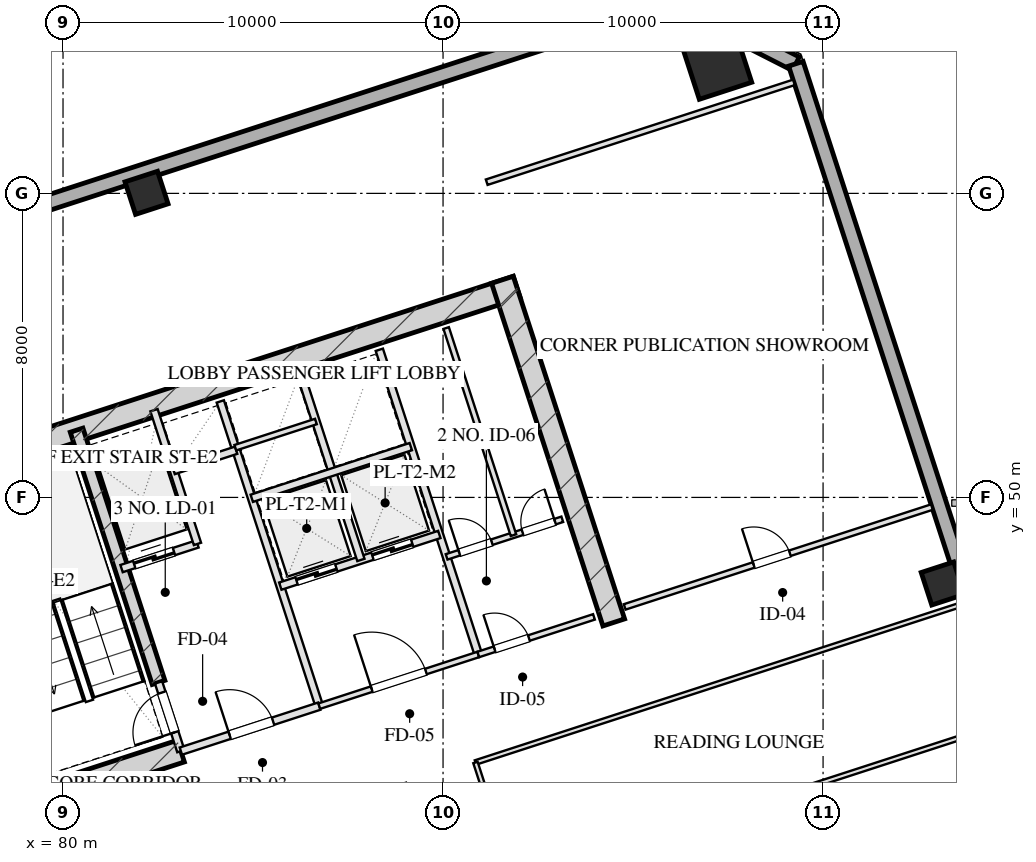
"""IFC4 building model, lengths in metres.
Left out: names, types, materials, properties, quantities, classifications, styles, units other than length and angle.
Written with IfcOpenShell. Run it as: python <this file> out.ifc"""

import sys

from ifc_helpers import new_model, si_unit, direction, frame, frame_2d, origin, origin_2d, place, context, subcontext, project, spatial, rectangle, hollow_rectangle, extrude, element, fill, save


model = new_model("IFC4")
c1 = context("Model", 3, precision=1e-05, world=origin(), true_north=direction((0.0, 1.0)))
c2 = subcontext(c1, "Body", "Model", "MODEL_VIEW")
j1 = project(units=[si_unit("LENGTHUNIT", "METRE"), si_unit("PLANEANGLEUNIT", "RADIAN")], contexts=[c1])
p1 = place(None, origin())
s1 = spatial("IfcSite", under=j1, at=p1, CompositionType="ELEMENT")
p2 = place(p1, origin())
s2 = spatial("IfcBuilding", under=s1, at=p2, CompositionType="ELEMENT")
p3 = place(p2, frame((0.0, 0.0, 120.75)))
s3 = spatial("IfcBuildingStorey", under=s2, at=p3, CompositionType="ELEMENT", Elevation=120.75)
p4 = place(p3, frame((76.344, 50.466, 0.0), z_axis=(0.0, 0.0, 1.0), x_axis=(0.951055727519, 0.309019421968, 0.0)))
e1 = element("IfcWall", 1, at=p4, inside=s3, PredefinedType="SHEAR", context=c2, shape_type="SweptSolid", body=[
    extrude(rectangle(XDim=16.4, YDim=0.6, at=frame_2d((8.2, 0.0))), origin(), (0.0, 0.0, 1.0), 3.45),
])
for number, where, z_axis, x_axis in (
    (2, (79.466, 41.828, 0.0), (0.0, 0.0, 1.0), (-0.309, 0.951, 0.0)),
    (3, (94.492, 46.71, 0.0), (0.0, 0.0, 1.0), (-0.309, 0.951, 0.0)),
):
    element("IfcWall", number, at=place(p3, frame(where, z_axis=z_axis, x_axis=x_axis)), inside=s3, PredefinedType="SHEAR", context=c2, shape_type="SweptSolid", body=[
        extrude(rectangle(XDim=9.48, YDim=0.6, at=frame_2d((4.74, 0.0))), origin(), (0.0, 0.0, 1.0), 3.45),
    ])
p5 = place(p3, frame((82.514, 45.131, 0.0), z_axis=(0.0, 0.0, 1.0), x_axis=(-0.308988790936, 0.951065679686, 0.0)))
e4 = element("IfcWall", 4, at=p5, inside=s3, PredefinedType="SHEAR", context=c2, shape_type="SweptSolid", body=[
    extrude(rectangle(XDim=6.98, YDim=0.35, at=frame_2d((3.49, 0.0))), origin(), (0.0, 0.0, 1.0), 3.45),
])
p6 = place(p3, frame((79.087, 42.021, 0.0), z_axis=(0.0, 0.0, 1.0), x_axis=(0.951062550203, 0.3089984233, 0.0)))
e5 = element("IfcWall", 5, at=p6, inside=s3, PredefinedType="SHEAR", context=c2, shape_type="SweptSolid", body=[
    extrude(rectangle(XDim=4.22, YDim=0.6, at=frame_2d((2.11, 0.0))), origin(), (0.0, 0.0, 1.0), 3.45),
])
p7 = place(p3, frame((97.209, 61.388, 0.0), z_axis=(0.0, 0.0, 1.0), x_axis=(0.951056516295, 0.309016994375, 0.0)))
e6 = element("IfcColumn", 6, at=p7, inside=s3, PredefinedType="COLUMN", context=c2, shape_type="SweptSolid", body=[
    extrude(hollow_rectangle(XDim=1.45, YDim=1.45, WallThickness=0.05, at=origin_2d()), origin(), (0.0, 0.0, 1.0), 3.451),
])
for number, where, z_axis, x_axis in (
    (7, (103.149, 47.736, 0.0), (0.0, 0.0, 1.0), (0.951, 0.309, 0.0)),
    (8, (82.197, 58.014, 0.0), (0.0, 0.0, 1.0), (0.951, 0.309, 0.0)),
):
    element("IfcColumn", number, at=place(p3, frame(where, z_axis=z_axis, x_axis=x_axis)), inside=s3, PredefinedType="COLUMN", context=c2, shape_type="SweptSolid", body=[
        extrude(hollow_rectangle(XDim=0.9, YDim=0.9, WallThickness=0.032, at=origin_2d()), origin(), (0.0, 0.0, 1.0), 3.451),
    ])
p8 = place(p3, frame((80.716, 6.59, 0.0), z_axis=(0.0, 0.0, 1.0), x_axis=(-0.309017542002, 0.95105633836, 0.0)))
e9 = element("IfcWall", 9, at=p8, inside=s3, PredefinedType="SOLIDWALL", context=c2, shape_type="SweptSolid", body=[
    extrude(rectangle(XDim=46.4, YDim=0.4, at=frame_2d((23.2, 0.0))), origin(), (0.0, 0.0, 1.0), 2.61),
])
p9 = place(p8, frame((15.6, 0.0, 0.75)))
e10 = element("IfcOpeningElement", 10, at=p9, cuts=e9, PredefinedType="OPENING", context=c2, shape_type="SweptSolid", body=[
    extrude(rectangle(XDim=2.4, YDim=1.46, at=frame_2d((1.2, 0.73))), frame((0.0, 0.21, 0.0), z_axis=(0.0, -1.0, 0.0), x_axis=(1.0, 0.0, 0.0)), (0.0, 0.0, 1.0), 0.42),
])
p10 = place(p8, frame((28.45, 0.0, 0.0)))
e11 = element("IfcOpeningElement", 11, at=p10, cuts=e9, PredefinedType="OPENING", context=c2, shape_type="SweptSolid", body=[
    extrude(rectangle(XDim=1.1, YDim=2.15, at=frame_2d((0.55, 1.075))), frame((0.0, 0.21, 0.0), z_axis=(0.0, -1.0, 0.0), x_axis=(1.0, 0.0, 0.0)), (0.0, 0.0, 1.0), 0.42),
])
p11 = place(p3, frame((68.047, 53.995, 0.0), z_axis=(0.0, 0.0, 1.0), x_axis=(0.95105505922, 0.309021478754, 0.0)))
e12 = element("IfcWall", 12, at=p11, inside=s3, PredefinedType="SOLIDWALL", context=c2, shape_type="SweptSolid", body=[
    extrude(rectangle(XDim=29.4, YDim=0.4, at=frame_2d((14.7, 0.0))), origin(), (0.0, 0.0, 1.0), 2.61),
])
p12 = place(p3, frame((96.008, 63.08, 0.0), z_axis=(0.0, 0.0, 1.0), x_axis=(0.891001999643, -0.45399937955, 0.0)))
e13 = element("IfcWall", 13, at=p12, inside=s3, PredefinedType="SOLIDWALL", context=c2, shape_type="SweptSolid", body=[
    extrude(rectangle(XDim=3.677, YDim=0.4, at=frame_2d((1.839, 0.0))), origin(), (0.0, 0.0, 1.0), 2.61),
])
p13 = place(p3, frame((99.284, 61.41, 0.0), z_axis=(0.0, 0.0, 1.0), x_axis=(0.309017542002, -0.95105633836, 0.0)))
e14 = element("IfcWall", 14, at=p13, inside=s3, PredefinedType="SOLIDWALL", context=c2, shape_type="SweptSolid", body=[
    extrude(rectangle(XDim=46.4, YDim=0.4, at=frame_2d((23.2, 0.0))), origin(), (0.0, 0.0, 1.0), 2.61),
])
p14 = place(p13, frame((20.05, 0.0, 0.0)))
e15 = element("IfcOpeningElement", 15, at=p14, cuts=e14, PredefinedType="OPENING", context=c2, shape_type="SweptSolid", body=[
    extrude(rectangle(XDim=1.1, YDim=2.15, at=frame_2d((0.55, 1.075))), frame((0.0, 0.21, 0.0), z_axis=(0.0, -1.0, 0.0), x_axis=(1.0, 0.0, 0.0)), (0.0, 0.0, 1.0), 0.42),
])
p15 = place(p3, frame((83.101, 43.324, 0.0), z_axis=(0.0, 0.0, 1.0), x_axis=(-0.309048298632, 0.951046344356, 0.0)))
e16 = element("IfcWall", 16, at=p15, inside=s3, PredefinedType="PARTITIONING", context=c2, shape_type="SweptSolid", body=[
    extrude(rectangle(XDim=1.9, YDim=0.2, at=frame_2d((0.95, 0.0))), origin(), (0.0, 0.0, 1.0), 3.175),
])
p16 = place(p15, frame((0.52, 0.0, 0.0)))
e17 = element("IfcOpeningElement", 17, at=p16, cuts=e16, PredefinedType="OPENING", context=c2, shape_type="SweptSolid", body=[
    extrude(rectangle(XDim=1.1, YDim=2.05, at=frame_2d((0.55, 1.025))), frame((0.0, 0.11, 0.0), z_axis=(0.0, -1.0, 0.0), x_axis=(1.0, 0.0, 0.0)), (0.0, 0.0, 1.0), 0.22),
])
p17 = place(p3, frame((86.743, 44.508, 0.0), z_axis=(0.0, 0.0, 1.0), x_axis=(-0.309016001439, 0.951056838919, 0.0)))
e18 = element("IfcWall", 18, at=p17, inside=s3, PredefinedType="PARTITIONING", context=c2, shape_type="SweptSolid", body=[
    extrude(rectangle(XDim=8.43, YDim=0.2, at=frame_2d((4.215, 0.0))), origin(), (0.0, 0.0, 1.0), 3.175),
])
p18 = place(p3, frame((83.101, 43.324, 0.0), z_axis=(0.0, 0.0, 1.0), x_axis=(0.951052804469, 0.309028417967, 0.0)))
e19 = element("IfcWall", 19, at=p18, inside=s3, PredefinedType="PARTITIONING", context=c2, shape_type="SweptSolid", body=[
    extrude(rectangle(XDim=3.83, YDim=0.2, at=frame_2d((1.915, 0.0))), origin(), (0.0, 0.0, 1.0), 3.175),
])
p19 = place(p18, frame((1.35, 0.0, 0.0)))
e20 = element("IfcOpeningElement", 20, at=p19, cuts=e19, PredefinedType="OPENING", context=c2, shape_type="SweptSolid", body=[
    extrude(rectangle(XDim=1.2, YDim=2.05, at=frame_2d((0.6, 1.025))), frame((0.0, 0.11, 0.0), z_axis=(0.0, -1.0, 0.0), x_axis=(1.0, 0.0, 0.0)), (0.0, 0.0, 1.0), 0.22),
])
p20 = place(p3, frame((81.54, 48.127, 0.0), z_axis=(0.0, 0.0, 1.0), x_axis=(0.951062257173, 0.308999325213, 0.0)))
e21 = element("IfcWall", 21, at=p20, inside=s3, PredefinedType="PARTITIONING", context=c2, shape_type="SweptSolid", body=[
    extrude(rectangle(XDim=2.1, YDim=0.2, at=frame_2d((1.05, 0.0))), origin(), (0.0, 0.0, 1.0), 3.175),
])
p21 = place(p20, frame((0.35, 0.0, 0.0)))
e22 = element("IfcOpeningElement", 22, at=p21, cuts=e21, PredefinedType="OPENING", context=c2, shape_type="SweptSolid", body=[
    extrude(rectangle(XDim=1.1, YDim=2.05, at=frame_2d((0.55, 1.025))), frame((0.0, 0.11, 0.0), z_axis=(0.0, -1.0, 0.0), x_axis=(1.0, 0.0, 0.0)), (0.0, 0.0, 1.0), 0.22),
])
p22 = place(p3, frame((83.538, 48.776, 0.0), z_axis=(0.0, 0.0, 1.0), x_axis=(-0.3089935693, 0.951064127245, 0.0)))
e23 = element("IfcWall", 23, at=p22, inside=s3, PredefinedType="PARTITIONING", context=c2, shape_type="SweptSolid", body=[
    extrude(rectangle(XDim=3.7, YDim=0.2, at=frame_2d((1.85, 0.0))), origin(), (0.0, 0.0, 1.0), 3.175),
])
p23 = place(p3, frame((82.91, 50.707, 0.0), z_axis=(0.0, 0.0, 1.0), x_axis=(0.951041328149, 0.309063734775, 0.0)))
e24 = element("IfcWall", 24, at=p23, inside=s3, PredefinedType="PARTITIONING", context=c2, shape_type="SweptSolid", body=[
    extrude(rectangle(XDim=1.73, YDim=0.2, at=frame_2d((0.865, 0.0))), origin(), (0.0, 0.0, 1.0), 3.175),
])
p24 = place(p3, frame((90.928, 45.868, 0.0), z_axis=(0.0, 0.0, 1.0), x_axis=(-0.309042196757, 0.951048327176, 0.0)))
e25 = element("IfcWall", 25, at=p24, inside=s3, PredefinedType="PARTITIONING", context=c2, shape_type="SweptSolid", body=[
    extrude(rectangle(XDim=8.43, YDim=0.2, at=frame_2d((4.215, 0.0))), origin(), (0.0, 0.0, 1.0), 3.175),
])
p25 = place(p3, frame((86.743, 44.508, 0.0), z_axis=(0.0, 0.0, 1.0), x_axis=(0.951063829732, 0.308994485023, 0.0)))
e26 = element("IfcWall", 26, at=p25, inside=s3, PredefinedType="PARTITIONING", context=c2, shape_type="SweptSolid", body=[
    extrude(rectangle(XDim=4.4, YDim=0.15, at=frame_2d((2.2, 0.0))), origin(), (0.0, 0.0, 1.0), 3.175),
])
p26 = place(p25, frame((1.45, 0.0, 0.0)))
e27 = element("IfcOpeningElement", 27, at=p26, cuts=e26, PredefinedType="OPENING", context=c2, shape_type="SweptSolid", body=[
    extrude(rectangle(XDim=1.5, YDim=2.05, at=frame_2d((0.75, 1.025))), frame((0.0, 0.085, 0.0), z_axis=(0.0, -1.0, 0.0), x_axis=(1.0, 0.0, 0.0)), (0.0, 0.0, 1.0), 0.17),
])
p27 = place(p3, frame((85.718, 47.666, 0.0), z_axis=(0.0, 0.0, 1.0), x_axis=(0.951058531764, 0.30901079133, 0.0)))
e28 = element("IfcWall", 28, at=p27, inside=s3, PredefinedType="PARTITIONING", context=c2, shape_type="SweptSolid", body=[
    extrude(rectangle(XDim=4.4, YDim=0.2, at=frame_2d((2.2, 0.0))), origin(), (0.0, 0.0, 1.0), 3.175),
])
p28 = place(p27, frame((0.45, 0.0, 0.0)))
e29 = element("IfcOpeningElement", 29, at=p28, cuts=e28, PredefinedType="OPENING", context=c2, shape_type="SweptSolid", body=[
    extrude(rectangle(XDim=1.1, YDim=2.05, at=frame_2d((0.55, 1.025))), frame((0.0, 0.11, 0.0), z_axis=(0.0, -1.0, 0.0), x_axis=(1.0, 0.0, 0.0)), (0.0, 0.0, 1.0), 0.22),
])
p29 = place(p27, frame((2.55, 0.0, 0.0)))
e30 = element("IfcOpeningElement", 30, at=p29, cuts=e28, PredefinedType="OPENING", context=c2, shape_type="SweptSolid", body=[
    extrude(rectangle(XDim=1.1, YDim=2.05, at=frame_2d((0.55, 1.025))), frame((0.0, 0.11, 0.0), z_axis=(0.0, -1.0, 0.0), x_axis=(1.0, 0.0, 0.0)), (0.0, 0.0, 1.0), 0.22),
])
p30 = place(p3, frame((87.838, 48.354, 0.0), z_axis=(0.0, 0.0, 1.0), x_axis=(-0.3090093719, 0.951058992953, 0.0)))
e31 = element("IfcWall", 31, at=p30, inside=s3, PredefinedType="PARTITIONING", context=c2, shape_type="SweptSolid", body=[
    extrude(rectangle(XDim=5.11, YDim=0.2, at=frame_2d((2.555, 0.0))), origin(), (0.0, 0.0, 1.0), 3.175),
])
p31 = place(p3, frame((84.967, 49.977, 0.0), z_axis=(0.0, 0.0, 1.0), x_axis=(0.951063829732, 0.308994485023, 0.0)))
e32 = element("IfcWall", 32, at=p31, inside=s3, PredefinedType="PARTITIONING", context=c2, shape_type="SweptSolid", body=[
    extrude(rectangle(XDim=4.4, YDim=0.2, at=frame_2d((2.2, 0.0))), origin(), (0.0, 0.0, 1.0), 3.175),
])
p32 = place(p3, frame((84.534, 51.308, 0.0), z_axis=(0.0, 0.0, 1.0), x_axis=(0.951075093106, 0.308959814982, 0.0)))
e33 = element("IfcWall", 33, at=p32, inside=s3, PredefinedType="PARTITIONING", context=c2, shape_type="SweptSolid", body=[
    extrude(rectangle(XDim=2.23, YDim=0.15, at=frame_2d((1.115, 0.0))), origin(), (0.0, 0.0, 1.0), 3.175),
])
p33 = place(p3, frame((90.928, 45.868, 0.0), z_axis=(0.0, 0.0, 1.0), x_axis=(0.951059297078, 0.309008435874, 0.0)))
e34 = element("IfcWall", 34, at=p33, inside=s3, PredefinedType="PARTITIONING", context=c2, shape_type="SweptSolid", body=[
    extrude(rectangle(XDim=3.2, YDim=0.15, at=frame_2d((1.6, 0.0))), origin(), (0.0, 0.0, 1.0), 3.175),
])
p34 = place(p33, frame((0.45, 0.0, 0.0)))
e35 = element("IfcOpeningElement", 35, at=p34, cuts=e34, PredefinedType="OPENING", context=c2, shape_type="SweptSolid", body=[
    extrude(rectangle(XDim=0.95, YDim=2.05, at=frame_2d((0.475, 1.025))), frame((0.0, 0.085, 0.0), z_axis=(0.0, -1.0, 0.0), x_axis=(1.0, 0.0, 0.0)), (0.0, 0.0, 1.0), 0.17),
])
p35 = place(p3, frame((90.094, 48.436, 0.0), z_axis=(0.0, 0.0, 1.0), x_axis=(0.951066581729, 0.308986014439, 0.0)))
e36 = element("IfcWall", 36, at=p35, inside=s3, PredefinedType="PARTITIONING", context=c2, shape_type="SweptSolid", body=[
    extrude(rectangle(XDim=3.2, YDim=0.15, at=frame_2d((1.6, 0.0))), origin(), (0.0, 0.0, 1.0), 3.175),
])
p36 = place(p35, frame((0.35, 0.0, 0.0)))
e37 = element("IfcOpeningElement", 37, at=p36, cuts=e36, PredefinedType="OPENING", context=c2, shape_type="SweptSolid", body=[
    extrude(rectangle(XDim=0.9, YDim=2.05, at=frame_2d((0.45, 1.025))), frame((0.0, 0.085, 0.0), z_axis=(0.0, -1.0, 0.0), x_axis=(1.0, 0.0, 0.0)), (0.0, 0.0, 1.0), 0.17),
])
p37 = place(p35, frame((2.1, 0.0, 0.0)))
e38 = element("IfcOpeningElement", 38, at=p37, cuts=e36, PredefinedType="OPENING", context=c2, shape_type="SweptSolid", body=[
    extrude(rectangle(XDim=0.9, YDim=2.05, at=frame_2d((0.45, 1.025))), frame((0.0, 0.085, 0.0), z_axis=(0.0, -1.0, 0.0), x_axis=(1.0, 0.0, 0.0)), (0.0, 0.0, 1.0), 0.17),
])
p38 = place(p3, frame((91.853, 49.007, 0.0), z_axis=(0.0, 0.0, 1.0), x_axis=(-0.309022487551, 0.951054731437, 0.0)))
e39 = element("IfcWall", 39, at=p38, inside=s3, PredefinedType="PARTITIONING", context=c2, shape_type="SweptSolid", body=[
    extrude(rectangle(XDim=5.73, YDim=0.15, at=frame_2d((2.865, 0.0))), origin(), (0.0, 0.0, 1.0), 3.175),
])
p39 = place(p3, frame((91.149, 58.294, 0.0), z_axis=(0.0, 0.0, 1.0), x_axis=(0.951062770994, 0.308997743729, 0.0)))
e40 = element("IfcWall", 40, at=p39, inside=s3, PredefinedType="PARTITIONING", context=c2, shape_type="SweptSolid", body=[
    extrude(rectangle(XDim=8.5, YDim=0.15, at=frame_2d((4.25, 0.0))), origin(), (0.0, 0.0, 1.0), 3.175),
])
p40 = place(p3, frame((94.78, 47.119, 0.0), z_axis=(0.0, 0.0, 1.0), x_axis=(0.951054329824, 0.309023723562, 0.0)))
e41 = element("IfcWall", 41, at=p40, inside=s3, PredefinedType="PARTITIONING", context=c2, shape_type="SweptSolid", body=[
    extrude(rectangle(XDim=8.5, YDim=0.15, at=frame_2d((4.25, 0.0))), origin(), (0.0, 0.0, 1.0), 3.175),
])
p41 = place(p40, frame((3.57, 0.0, 0.0)))
e42 = element("IfcOpeningElement", 42, at=p41, cuts=e41, PredefinedType="OPENING", context=c2, shape_type="SweptSolid", body=[
    extrude(rectangle(XDim=1.0, YDim=2.05, at=frame_2d((0.5, 1.025))), frame((0.0, 0.085, 0.0), z_axis=(0.0, -1.0, 0.0), x_axis=(1.0, 0.0, 0.0)), (0.0, 0.0, 1.0), 0.17),
])
p42 = place(p3, frame((90.853, 43.025, 0.0), z_axis=(0.0, 0.0, 1.0), x_axis=(0.951054001411, 0.309024734286, 0.0)))
e43 = element("IfcWall", 43, at=p42, inside=s3, PredefinedType="PARTITIONING", context=c2, shape_type="SweptSolid", body=[
    extrude(rectangle(XDim=13.5, YDim=0.12, at=frame_2d((6.75, 0.0))), origin(), (0.0, 0.0, 1.0), 3.175),
])
p43 = place(p3, frame((95.995, 27.2, 0.0), z_axis=(0.0, 0.0, 1.0), x_axis=(-0.309022042254, 0.951054876125, 0.0)))
e44 = element("IfcWall", 44, at=p43, inside=s3, PredefinedType="PARTITIONING", context=c2, shape_type="SweptSolid", body=[
    extrude(rectangle(XDim=16.64, YDim=0.12, at=frame_2d((8.32, 0.0))), origin(), (0.0, 0.0, 1.0), 3.175),
])
p44 = place(p43, frame((1.16, 0.0, 0.0)))
e45 = element("IfcOpeningElement", 45, at=p44, cuts=e44, PredefinedType="OPENING", context=c2, shape_type="SweptSolid", body=[
    extrude(rectangle(XDim=1.0, YDim=2.05, at=frame_2d((0.5, 1.025))), frame((0.0, 0.07, 0.0), z_axis=(0.0, -1.0, 0.0), x_axis=(1.0, 0.0, 0.0)), (0.0, 0.0, 1.0), 0.14),
])
p45 = place(p43, frame((5.48, 0.0, 0.0)))
e46 = element("IfcOpeningElement", 46, at=p45, cuts=e44, PredefinedType="OPENING", context=c2, shape_type="SweptSolid", body=[
    extrude(rectangle(XDim=1.0, YDim=2.05, at=frame_2d((0.5, 1.025))), frame((0.0, 0.07, 0.0), z_axis=(0.0, -1.0, 0.0), x_axis=(1.0, 0.0, 0.0)), (0.0, 0.0, 1.0), 0.14),
])
p46 = place(p43, frame((9.48, 0.0, 0.0)))
e47 = element("IfcOpeningElement", 47, at=p46, cuts=e44, PredefinedType="OPENING", context=c2, shape_type="SweptSolid", body=[
    extrude(rectangle(XDim=1.0, YDim=2.05, at=frame_2d((0.5, 1.025))), frame((0.0, 0.07, 0.0), z_axis=(0.0, -1.0, 0.0), x_axis=(1.0, 0.0, 0.0)), (0.0, 0.0, 1.0), 0.14),
])
p47 = place(p43, frame((14.48, 0.0, 0.0)))
e48 = element("IfcOpeningElement", 48, at=p47, cuts=e44, PredefinedType="OPENING", context=c2, shape_type="SweptSolid", body=[
    extrude(rectangle(XDim=1.0, YDim=2.05, at=frame_2d((0.5, 1.025))), frame((0.0, 0.07, 0.0), z_axis=(0.0, -1.0, 0.0), x_axis=(1.0, 0.0, 0.0)), (0.0, 0.0, 1.0), 0.14),
])
p48 = place(p3, frame((91.879, 39.868, 0.0), z_axis=(0.0, 0.0, 1.0), x_axis=(0.951054001411, 0.309024734286, 0.0)))
e49 = element("IfcWall", 49, at=p48, inside=s3, PredefinedType="PARTITIONING", context=c2, shape_type="SweptSolid", body=[
    extrude(rectangle(XDim=13.5, YDim=0.12, at=frame_2d((6.75, 0.0))), origin(), (0.0, 0.0, 1.0), 3.175),
])
p49 = place(p16, origin())
e50 = element("IfcDoor", 50, at=p49, inside=s3, OperationType="SINGLE_SWING_LEFT", PredefinedType="DOOR", context=c2, shape_type="SweptSolid", body=[
    extrude(rectangle(XDim=1.1, YDim=2.05, at=frame_2d((0.55, 1.025))), frame((0.0, 0.025, 0.0), z_axis=(0.0, -1.0, 0.0), x_axis=(1.0, 0.0, 0.0)), (0.0, 0.0, 1.0), 0.05),
])
fill(e17, e50)
p50 = place(p19, origin())
e51 = element("IfcDoor", 51, at=p50, inside=s3, OperationType="SINGLE_SWING_LEFT", PredefinedType="DOOR", context=c2, shape_type="SweptSolid", body=[
    extrude(rectangle(XDim=1.2, YDim=2.05, at=frame_2d((0.6, 1.025))), frame((0.0, 0.025, 0.0), z_axis=(0.0, -1.0, 0.0), x_axis=(1.0, 0.0, 0.0)), (0.0, 0.0, 1.0), 0.05),
])
fill(e20, e51)
p51 = place(p21, origin())
e52 = element("IfcDoor", 52, at=p51, inside=s3, OperationType="DOUBLE_DOOR_SLIDING", PredefinedType="DOOR", context=c2, shape_type="SweptSolid", body=[
    extrude(rectangle(XDim=1.1, YDim=2.05, at=frame_2d((0.55, 1.025))), frame((0.0, 0.025, 0.0), z_axis=(0.0, -1.0, 0.0), x_axis=(1.0, 0.0, 0.0)), (0.0, 0.0, 1.0), 0.05),
])
fill(e22, e52)
p52 = place(p26, origin())
e53 = element("IfcDoor", 53, at=p52, inside=s3, OperationType="SINGLE_SWING_LEFT", PredefinedType="DOOR", context=c2, shape_type="SweptSolid", body=[
    extrude(rectangle(XDim=1.5, YDim=2.05, at=frame_2d((0.75, 1.025))), frame((0.0, 0.025, 0.0), z_axis=(0.0, -1.0, 0.0), x_axis=(1.0, 0.0, 0.0)), (0.0, 0.0, 1.0), 0.05),
])
fill(e27, e53)
p53 = place(p28, origin())
e54 = element("IfcDoor", 54, at=p53, inside=s3, OperationType="DOUBLE_DOOR_SLIDING", PredefinedType="DOOR", context=c2, shape_type="SweptSolid", body=[
    extrude(rectangle(XDim=1.1, YDim=2.05, at=frame_2d((0.55, 1.025))), frame((0.0, 0.025, 0.0), z_axis=(0.0, -1.0, 0.0), x_axis=(1.0, 0.0, 0.0)), (0.0, 0.0, 1.0), 0.05),
])
fill(e29, e54)
p54 = place(p29, origin())
e55 = element("IfcDoor", 55, at=p54, inside=s3, OperationType="DOUBLE_DOOR_SLIDING", PredefinedType="DOOR", context=c2, shape_type="SweptSolid", body=[
    extrude(rectangle(XDim=1.1, YDim=2.05, at=frame_2d((0.55, 1.025))), frame((0.0, 0.025, 0.0), z_axis=(0.0, -1.0, 0.0), x_axis=(1.0, 0.0, 0.0)), (0.0, 0.0, 1.0), 0.05),
])
fill(e30, e55)
p55 = place(p34, origin())
e56 = element("IfcDoor", 56, at=p55, inside=s3, OperationType="SINGLE_SWING_LEFT", PredefinedType="DOOR", context=c2, shape_type="SweptSolid", body=[
    extrude(rectangle(XDim=0.95, YDim=2.05, at=frame_2d((0.475, 1.025))), frame((0.0, 0.025, 0.0), z_axis=(0.0, -1.0, 0.0), x_axis=(1.0, 0.0, 0.0)), (0.0, 0.0, 1.0), 0.05),
])
fill(e35, e56)
p56 = place(p36, origin())
e57 = element("IfcDoor", 57, at=p56, inside=s3, OperationType="SINGLE_SWING_LEFT", PredefinedType="DOOR", context=c2, shape_type="SweptSolid", body=[
    extrude(rectangle(XDim=0.9, YDim=2.05, at=frame_2d((0.45, 1.025))), frame((0.0, 0.025, 0.0), z_axis=(0.0, -1.0, 0.0), x_axis=(1.0, 0.0, 0.0)), (0.0, 0.0, 1.0), 0.05),
])
fill(e37, e57)
p57 = place(p37, origin())
e58 = element("IfcDoor", 58, at=p57, inside=s3, OperationType="SINGLE_SWING_RIGHT", PredefinedType="DOOR", context=c2, shape_type="SweptSolid", body=[
    extrude(rectangle(XDim=0.9, YDim=2.05, at=frame_2d((0.45, 1.025))), frame((0.0, 0.025, 0.0), z_axis=(0.0, -1.0, 0.0), x_axis=(1.0, 0.0, 0.0)), (0.0, 0.0, 1.0), 0.05),
])
fill(e38, e58)
p58 = place(p41, origin())
e59 = element("IfcDoor", 59, at=p58, inside=s3, OperationType="SINGLE_SWING_LEFT", PredefinedType="DOOR", context=c2, shape_type="SweptSolid", body=[
    extrude(rectangle(XDim=1.0, YDim=2.05, at=frame_2d((0.5, 1.025))), frame((0.0, 0.025, 0.0), z_axis=(0.0, -1.0, 0.0), x_axis=(1.0, 0.0, 0.0)), (0.0, 0.0, 1.0), 0.05),
])
fill(e42, e59)
save(model, sys.argv[1])
